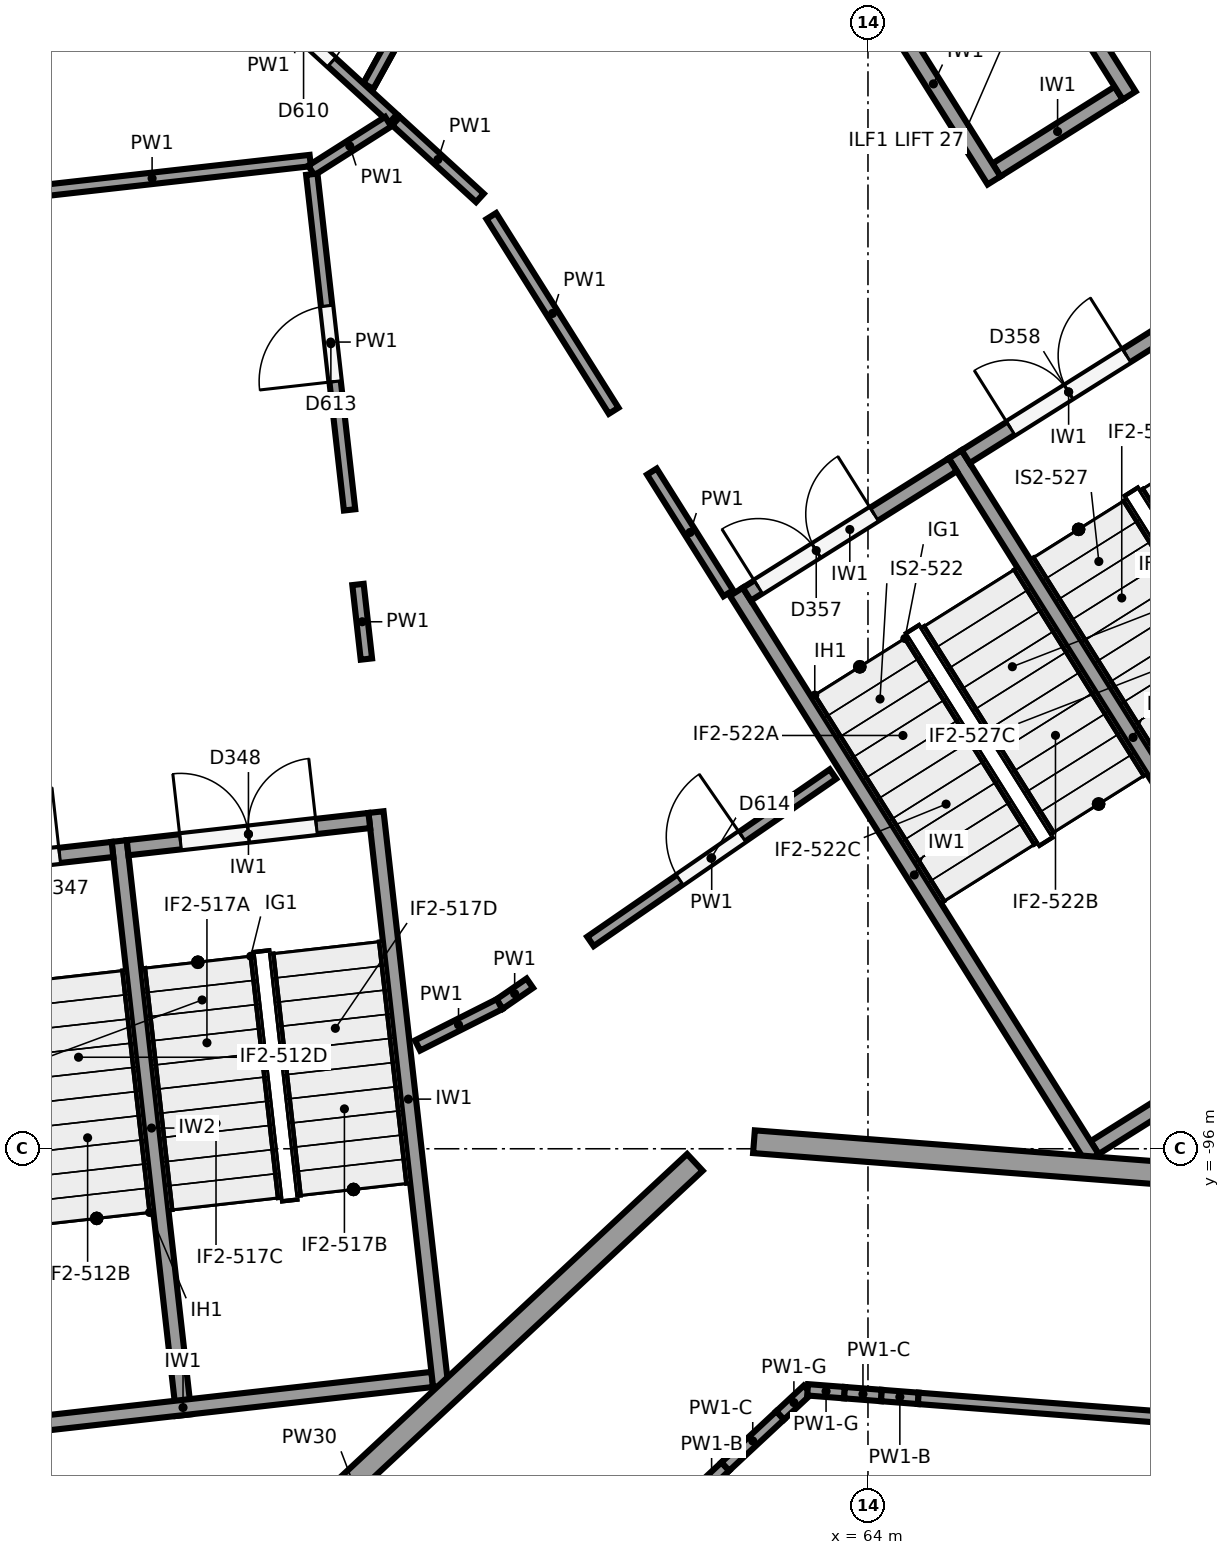
"""IFC4 building model, lengths in metres.
Left out: names, types, materials, properties, quantities, classifications, styles, units other than length and angle.
Written with IfcOpenShell. Run it as: python <this file> out.ifc"""

import sys

from ifc_helpers import new_model, si_unit, direction, frame, frame_2d, origin, origin_2d, place, context, subcontext, project, spatial, rectangle, circle, extrude, element, fill, save


model = new_model("IFC4")
c1 = context("Model", 3, precision=1e-05, world=origin(), true_north=direction((0.0, 1.0)))
c2 = subcontext(c1, "Body", "Model", "MODEL_VIEW")
j1 = project(units=[si_unit("LENGTHUNIT", "METRE"), si_unit("PLANEANGLEUNIT", "RADIAN")], contexts=[c1])
p1 = place(None, origin())
s1 = spatial("IfcSite", under=j1, at=p1, CompositionType="ELEMENT")
p2 = place(p1, origin())
s2 = spatial("IfcBuilding", under=s1, at=p2, CompositionType="ELEMENT")
p3 = place(p2, origin())
s3 = spatial("IfcBuildingStorey", under=s2, at=p3, CompositionType="ELEMENT", Elevation=0.0)
for number, where, z_axis, x_axis in (
    (1, (55.8, -88.542, 0.0), (0.0, 0.0, 1.0), (1.0, 0.0, 0.0)),
    (2, (62.052, -95.873, 0.0), (0.0, 0.0, 1.0), (1.0, 0.0, 0.0)),
):
    element("IfcColumn", number, at=place(p3, frame(where, z_axis=z_axis, x_axis=x_axis)), inside=s3, PredefinedType="COLUMN", context=c2, shape_type="SweptSolid", body=[
        extrude(circle(Radius=0.45, at=origin_2d()), origin(), (0.0, 0.0, 1.0), 6.5),
    ])
p4 = place(p3, frame((63.731, -85.771, 0.0), z_axis=(0.0, 0.0, 1.0), x_axis=(1.0, 0.0, 0.0)))
e3 = element("IfcColumn", 3, at=p4, inside=s3, PredefinedType="COLUMN", context=c2, shape_type="SweptSolid", body=[
    extrude(circle(Radius=0.6, at=origin_2d()), origin(), (0.0, 0.0, 1.0), 6.5),
])
p5 = place(p3, frame((63.373, -99.648, -0.3), z_axis=(0.0, 0.0, 1.0), x_axis=(1.0, 0.0, 0.0)))
e4 = element("IfcColumn", 4, at=p5, inside=s3, PredefinedType="COLUMN", context=c2, shape_type="SweptSolid", body=[
    extrude(circle(Radius=0.4, at=origin_2d()), origin(), (0.0, 0.0, 1.0), 6.8),
])
p6 = place(p3, frame((61.723, -96.179, 0.0), z_axis=(0.0, 0.0, 1.0), x_axis=(-0.731540985517, -0.681797467368, 0.0)))
e5 = element("IfcWall", 5, at=p6, inside=s3, PredefinedType="SOLIDWALL", context=c2, shape_type="SweptSolid", body=[
    extrude(rectangle(XDim=12.314, YDim=0.3, at=frame_2d((6.157, 0.0))), origin(), (0.0, 0.0, 1.0), 4.85),
])
p7 = place(p3, frame((74.977, -96.87, 0.0), z_axis=(0.0, 0.0, 1.0), x_axis=(-0.997035289114, 0.076945644854, 0.0)))
e6 = element("IfcWall", 6, at=p7, inside=s3, PredefinedType="SOLIDWALL", context=c2, shape_type="SweptSolid", body=[
    extrude(rectangle(XDim=12.514, YDim=0.3, at=frame_2d((6.257, 0.0))), origin(), (0.0, 0.0, 1.0), 4.85),
])
p8 = place(p3, frame((58.378, -99.123, 0.0), z_axis=(0.0, 0.0, 1.0), x_axis=(-0.111982724367, 0.993710153638, 0.0)))
e7 = element("IfcWall", 7, at=p8, inside=s3, PredefinedType="SHEAR", context=c2, shape_type="SweptSolid", body=[
    extrude(rectangle(XDim=7.6, YDim=0.2, at=frame_2d((3.8, 0.0))), origin(), (0.0, 0.0, 1.0), 6.15),
])
p9 = place(p3, frame((51.709, -99.774, 0.0), z_axis=(0.0, 0.0, 1.0), x_axis=(0.993715690617, 0.111933579504, 0.0)))
e8 = element("IfcWall", 8, at=p9, inside=s3, PredefinedType="SHEAR", context=c2, shape_type="SweptSolid", body=[
    extrude(rectangle(XDim=6.6, YDim=0.2, at=frame_2d((3.3, 0.0))), origin(), (0.0, 0.0, 1.0), 6.15),
])
p10 = place(p3, frame((54.999, -99.504, 0.0), z_axis=(0.0, 0.0, 1.0), x_axis=(-0.111982724367, 0.993710153638, 0.0)))
e9 = element("IfcWall", 9, at=p10, inside=s3, PredefinedType="SHEAR", context=c2, shape_type="SweptSolid", body=[
    extrude(rectangle(XDim=7.6, YDim=0.2, at=frame_2d((3.8, 0.0))), origin(), (0.0, 0.0, 1.0), 6.15),
])
p11 = place(p3, frame((50.88, -92.42, 0.0), z_axis=(0.0, 0.0, 1.0), x_axis=(0.993707560215, 0.112005735442, 0.0)))
e10 = element("IfcWall", 10, at=p11, inside=s3, PredefinedType="SHEAR", context=c2, shape_type="SweptSolid", body=[
    extrude(rectangle(XDim=3.2, YDim=0.2, at=frame_2d((1.6, 0.0))), origin(), (0.0, 0.0, 1.0), 6.15),
])
p12 = place(p11, frame((0.7, 0.0, 0.0)))
e11 = element("IfcOpeningElement", 11, at=p12, cuts=e10, PredefinedType="OPENING", context=c2, shape_type="SweptSolid", body=[
    extrude(rectangle(XDim=1.8, YDim=2.1, at=frame_2d((0.9, 1.05))), frame((0.0, 0.11, 0.0), z_axis=(0.0, -1.0, 0.0), x_axis=(1.0, 0.0, 0.0)), (0.0, 0.0, 1.0), 0.22),
])
p13 = place(p3, frame((54.259, -92.04, 0.0), z_axis=(0.0, 0.0, 1.0), x_axis=(0.993717005286, 0.11192190762, 0.0)))
e12 = element("IfcWall", 12, at=p13, inside=s3, PredefinedType="SHEAR", context=c2, shape_type="SweptSolid", body=[
    extrude(rectangle(XDim=3.2, YDim=0.2, at=frame_2d((1.6, 0.0))), origin(), (0.0, 0.0, 1.0), 6.15),
])
p14 = place(p13, frame((0.7, 0.0, 0.0)))
e13 = element("IfcOpeningElement", 13, at=p14, cuts=e12, PredefinedType="OPENING", context=c2, shape_type="SweptSolid", body=[
    extrude(rectangle(XDim=1.8, YDim=2.1, at=frame_2d((0.9, 1.05))), frame((0.0, 0.11, 0.0), z_axis=(0.0, -1.0, 0.0), x_axis=(1.0, 0.0, 0.0)), (0.0, 0.0, 1.0), 0.22),
])
p15 = place(p3, frame((66.95, -96.123, 0.0), z_axis=(0.0, 0.0, 1.0), x_axis=(-0.532032334759, 0.846724036963, 0.0)))
e14 = element("IfcWall", 14, at=p15, inside=s3, PredefinedType="SHEAR", context=c2, shape_type="SweptSolid", body=[
    extrude(rectangle(XDim=8.8, YDim=0.2, at=frame_2d((4.4, 0.0))), origin(), (0.0, 0.0, 1.0), 6.15),
])
p16 = place(p3, frame((66.982, -95.986, 0.0), z_axis=(0.0, 0.0, 1.0), x_axis=(0.846719870989, 0.532038964807, 0.0)))
e15 = element("IfcWall", 15, at=p16, inside=s3, PredefinedType="SHEAR", context=c2, shape_type="SweptSolid", body=[
    extrude(rectangle(XDim=6.6, YDim=0.2, at=frame_2d((3.3, 0.0))), origin(), (0.0, 0.0, 1.0), 6.15),
])
p17 = place(p3, frame((69.829, -94.314, 0.0), z_axis=(0.0, 0.0, 1.0), x_axis=(-0.532032334759, 0.846724036963, 0.0)))
e16 = element("IfcWall", 16, at=p17, inside=s3, PredefinedType="SHEAR", context=c2, shape_type="SweptSolid", body=[
    extrude(rectangle(XDim=8.8, YDim=0.2, at=frame_2d((4.4, 0.0))), origin(), (0.0, 0.0, 1.0), 6.15),
])
p18 = place(p3, frame((62.406, -88.704, 0.0), z_axis=(0.0, 0.0, 1.0), x_axis=(0.846735733015, 0.532013720158, 0.0)))
e17 = element("IfcWall", 17, at=p18, inside=s3, PredefinedType="SHEAR", context=c2, shape_type="SweptSolid", body=[
    extrude(rectangle(XDim=3.2, YDim=0.2, at=frame_2d((1.6, 0.0))), origin(), (0.0, 0.0, 1.0), 6.15),
])
p19 = place(p18, frame((0.178, 0.0, 0.0)))
e18 = element("IfcOpeningElement", 18, at=p19, cuts=e17, PredefinedType="OPENING", context=c2, shape_type="SweptSolid", body=[
    extrude(rectangle(XDim=1.8, YDim=2.1, at=frame_2d((0.9, 1.05))), frame((0.0, 0.11, 0.0), z_axis=(0.0, -1.0, 0.0), x_axis=(1.0, 0.0, 0.0)), (0.0, 0.0, 1.0), 0.22),
])
p20 = place(p3, frame((65.285, -86.895, 0.0), z_axis=(0.0, 0.0, 1.0), x_axis=(0.846735733015, 0.532013720158, 0.0)))
e19 = element("IfcWall", 19, at=p20, inside=s3, PredefinedType="SHEAR", context=c2, shape_type="SweptSolid", body=[
    extrude(rectangle(XDim=3.2, YDim=0.2, at=frame_2d((1.6, 0.0))), origin(), (0.0, 0.0, 1.0), 6.15),
])
p21 = place(p20, frame((0.7, 0.0, 0.0)))
e20 = element("IfcOpeningElement", 20, at=p21, cuts=e19, PredefinedType="OPENING", context=c2, shape_type="SweptSolid", body=[
    extrude(rectangle(XDim=1.8, YDim=2.1, at=frame_2d((0.9, 1.05))), frame((0.0, 0.11, 0.0), z_axis=(0.0, -1.0, 0.0), x_axis=(1.0, 0.0, 0.0)), (0.0, 0.0, 1.0), 0.22),
])
p22 = place(p3, frame((65.659, -83.26, 0.0), z_axis=(0.0, 0.0, 1.0), x_axis=(-0.532074873955, 0.846697306306, 0.0)))
e21 = element("IfcWall", 21, at=p22, inside=s3, PredefinedType="SHEAR", context=c2, shape_type="SweptSolid", body=[
    extrude(rectangle(XDim=3.0, YDim=0.2, at=frame_2d((1.5, 0.0))), origin(), (0.0, 0.0, 1.0), 6.15),
])
p23 = place(p3, frame((67.437, -82.143, 0.0), z_axis=(0.0, 0.0, 1.0), x_axis=(-0.532038212918, 0.84672034344, 0.0)))
e22 = element("IfcWall", 22, at=p23, inside=s3, PredefinedType="SHEAR", context=c2, shape_type="SweptSolid", body=[
    extrude(rectangle(XDim=3.0, YDim=0.2, at=frame_2d((1.5, 0.0))), origin(), (0.0, 0.0, 1.0), 6.15),
])
p24 = place(p3, frame((65.69, -83.123, 0.0), z_axis=(0.0, 0.0, 1.0), x_axis=(0.846674592738, 0.532111016623, 0.0)))
e23 = element("IfcWall", 23, at=p24, inside=s3, PredefinedType="SHEAR", context=c2, shape_type="SweptSolid", body=[
    extrude(rectangle(XDim=1.9, YDim=0.2, at=frame_2d((0.95, 0.0))), origin(), (0.0, 0.0, 1.0), 6.15),
])
p25 = place(p3, frame((56.662, -82.999, 0.0), z_axis=(0.0, 0.0, 1.0), x_axis=(-0.993714788705, -0.111941586148, 0.0)))
e24 = element("IfcWall", 24, at=p25, inside=s3, PredefinedType="PARTITIONING", context=c2, shape_type="SweptSolid", body=[
    extrude(rectangle(XDim=4.188, YDim=0.15, at=frame_2d((2.094, 0.0))), origin(), (0.0, 0.0, 1.0), 6.15),
])
p26 = place(p3, frame((55.32, -80.218, 0.0), z_axis=(0.0, 0.0, 1.0), x_axis=(0.73761168742, -0.675225146586, 0.0)))
e25 = element("IfcWall", 25, at=p26, inside=s3, PredefinedType="PARTITIONING", context=c2, shape_type="SweptSolid", body=[
    extrude(rectangle(XDim=3.299, YDim=0.15, at=frame_2d((1.649, 0.0))), origin(), (0.0, 0.0, 1.0), 6.15),
])
p27 = place(p26, frame((1.2, 0.0, 0.0)))
e26 = element("IfcOpeningElement", 26, at=p27, cuts=e25, PredefinedType="OPENING", context=c2, shape_type="SweptSolid", body=[
    extrude(rectangle(XDim=1.0, YDim=2.1, at=frame_2d((0.5, 1.05))), frame((0.0, 0.085, 0.0), z_axis=(0.0, -1.0, 0.0), x_axis=(1.0, 0.0, 0.0)), (0.0, 0.0, 1.0), 0.17),
])
p28 = place(p3, frame((57.688, -82.487, 0.0), z_axis=(0.0, 0.0, 1.0), x_axis=(-0.844198175742, -0.536031193192, 0.0)))
e27 = element("IfcWall", 27, at=p28, inside=s3, PredefinedType="PARTITIONING", context=c2, shape_type="SweptSolid", body=[
    extrude(rectangle(XDim=1.198, YDim=0.15, at=frame_2d((0.599, 0.0))), origin(), (0.0, 0.0, 1.0), 6.15),
])
p29 = place(p3, frame((57.401, -89.557, 0.0), z_axis=(0.0, 0.0, 1.0), x_axis=(-0.111977847894, 0.993710703163, 0.0)))
e28 = element("IfcWall", 28, at=p29, inside=s3, PredefinedType="PARTITIONING", context=c2, shape_type="SweptSolid", body=[
    extrude(rectangle(XDim=0.988, YDim=0.15, at=frame_2d((0.494, 0.0))), origin(), (0.0, 0.0, 1.0), 6.15),
])
p30 = place(p3, frame((57.18, -87.595, 0.0), z_axis=(0.0, 0.0, 1.0), x_axis=(-0.112023313707, 0.993705578723, 0.0)))
e29 = element("IfcWall", 29, at=p30, inside=s3, PredefinedType="PARTITIONING", context=c2, shape_type="SweptSolid", body=[
    extrude(rectangle(XDim=4.444, YDim=0.15, at=frame_2d((2.222, 0.0))), origin(), (0.0, 0.0, 1.0), 6.15),
])
p31 = place(p30, frame((1.7, 0.0, 0.0)))
e30 = element("IfcOpeningElement", 30, at=p31, cuts=e29, PredefinedType="OPENING", context=c2, shape_type="SweptSolid", body=[
    extrude(rectangle(XDim=1.0, YDim=2.1, at=frame_2d((0.5, 1.05))), frame((0.0, 0.085, 0.0), z_axis=(0.0, -1.0, 0.0), x_axis=(1.0, 0.0, 0.0)), (0.0, 0.0, 1.0), 0.17),
])
p32 = place(p3, frame((57.79, -82.479, 0.0), z_axis=(0.0, 0.0, 1.0), x_axis=(0.737580634044, -0.675259067531, 0.0)))
e31 = element("IfcWall", 31, at=p32, inside=s3, PredefinedType="PARTITIONING", context=c2, shape_type="SweptSolid", body=[
    extrude(rectangle(XDim=1.496, YDim=0.15, at=frame_2d((0.748, 0.0))), origin(), (0.0, 0.0, 1.0), 6.15),
])
p33 = place(p3, frame((59.044, -83.729, 0.0), z_axis=(0.0, 0.0, 1.0), x_axis=(0.532093859438, -0.846685375301, 0.0)))
e32 = element("IfcWall", 32, at=p33, inside=s3, PredefinedType="PARTITIONING", context=c2, shape_type="SweptSolid", body=[
    extrude(rectangle(XDim=3.025, YDim=0.15, at=frame_2d((1.513, 0.0))), origin(), (0.0, 0.0, 1.0), 6.15),
])
p34 = place(p3, frame((61.157, -87.091, 0.0), z_axis=(0.0, 0.0, 1.0), x_axis=(0.532052497691, -0.84671136741, 0.0)))
e33 = element("IfcWall", 33, at=p34, inside=s3, PredefinedType="PARTITIONING", context=c2, shape_type="SweptSolid", body=[
    extrude(rectangle(XDim=1.89, YDim=0.15, at=frame_2d((0.945, 0.0))), origin(), (0.0, 0.0, 1.0), 6.15),
])
p35 = place(p3, frame((60.348, -93.272, 0.0), z_axis=(0.0, 0.0, 1.0), x_axis=(0.823118384127, 0.567869814053, 0.0)))
e34 = element("IfcWall", 34, at=p35, inside=s3, PredefinedType="PARTITIONING", context=c2, shape_type="SweptSolid", body=[
    extrude(rectangle(XDim=3.877, YDim=0.15, at=frame_2d((1.938, 0.0))), origin(), (0.0, 0.0, 1.0), 6.15),
])
p36 = place(p35, frame((1.427, 0.0, 0.0)))
e35 = element("IfcOpeningElement", 35, at=p36, cuts=e34, PredefinedType="OPENING", context=c2, shape_type="SweptSolid", body=[
    extrude(rectangle(XDim=1.0, YDim=2.1, at=frame_2d((0.5, 1.05))), frame((0.0, 0.085, 0.0), z_axis=(0.0, -1.0, 0.0), x_axis=(1.0, 0.0, 0.0)), (0.0, 0.0, 1.0), 0.17),
])
p37 = place(p3, frame((59.551, -93.823, 0.0), z_axis=(0.0, 0.0, 1.0), x_axis=(-0.823188427996, -0.567768273165, 0.0)))
e36 = element("IfcWall", 36, at=p37, inside=s3, PredefinedType="PARTITIONING", context=c2, shape_type="SweptSolid", body=[
    extrude(rectangle(XDim=0.485, YDim=0.15, at=frame_2d((0.242, 0.0))), origin(), (0.0, 0.0, 1.0), 6.15),
])
p38 = place(p3, frame((59.152, -94.098, 0.0), z_axis=(0.0, 0.0, 1.0), x_axis=(-0.89288454256, -0.450285680049, 0.0)))
e37 = element("IfcWall", 37, at=p38, inside=s3, PredefinedType="PARTITIONING", context=c2, shape_type="SweptSolid", body=[
    extrude(rectangle(XDim=1.207, YDim=0.15, at=frame_2d((0.604, 0.0))), origin(), (0.0, 0.0, 1.0), 6.15),
])
p39 = place(p3, frame((61.762, -100.517, 0.0), z_axis=(0.0, 0.0, 1.0), x_axis=(0.731417207669, 0.681930251805, 0.0)))
e38 = element("IfcWall", 38, at=p39, inside=s3, PredefinedType="PARTITIONING", context=c2, shape_type="SweptSolid", body=[
    extrude(rectangle(XDim=0.493, YDim=0.15, at=frame_2d((0.247, 0.0))), origin(), (0.0, 0.0, 1.0), 4.85),
])
p40 = place(p3, frame((62.123, -100.18, 0.0), z_axis=(0.0, 0.0, 1.0), x_axis=(0.731655638736, 0.681674428379, 0.0)))
e39 = element("IfcWall", 39, at=p40, inside=s3, PredefinedType="PARTITIONING", context=c2, shape_type="SweptSolid", body=[
    extrude(rectangle(XDim=0.987, YDim=0.15, at=frame_2d((0.493, 0.0))), origin(), (0.0, 0.0, 1.0), 6.05),
])
p41 = place(p3, frame((62.845, -99.508, 0.0), z_axis=(0.0, 0.0, 1.0), x_axis=(0.731417207669, 0.681930251805, 0.0)))
e40 = element("IfcWall", 40, at=p41, inside=s3, PredefinedType="PARTITIONING", context=c2, shape_type="SweptSolid", body=[
    extrude(rectangle(XDim=0.493, YDim=0.15, at=frame_2d((0.247, 0.0))), origin(), (0.0, 0.0, 1.0), 5.4),
])
p42 = place(p3, frame((63.206, -99.171, 0.0), z_axis=(0.0, 0.0, 1.0), x_axis=(0.997051534558, -0.076734851503, 0.0)))
e41 = element("IfcWall", 41, at=p42, inside=s3, PredefinedType="PARTITIONING", context=c2, shape_type="SweptSolid", body=[
    extrude(rectangle(XDim=0.487, YDim=0.15, at=frame_2d((0.243, 0.0))), origin(), (0.0, 0.0, 1.0), 5.4),
])
p43 = place(p3, frame((63.691, -99.209, 0.0), z_axis=(0.0, 0.0, 1.0), x_axis=(0.997054485502, -0.076696498885, 0.0)))
e42 = element("IfcWall", 42, at=p43, inside=s3, PredefinedType="PARTITIONING", context=c2, shape_type="SweptSolid", body=[
    extrude(rectangle(XDim=0.487, YDim=0.15, at=frame_2d((0.244, 0.0))), origin(), (0.0, 0.0, 1.0), 6.05),
])
p44 = place(p3, frame((64.177, -99.246, 0.0), z_axis=(0.0, 0.0, 1.0), x_axis=(0.99701303965, -0.07723340448, 0.0)))
e43 = element("IfcWall", 43, at=p44, inside=s3, PredefinedType="PARTITIONING", context=c2, shape_type="SweptSolid", body=[
    extrude(rectangle(XDim=0.487, YDim=0.15, at=frame_2d((0.243, 0.0))), origin(), (0.0, 0.0, 1.0), 4.85),
])
p45 = place(p3, frame((64.662, -99.284, 0.0), z_axis=(0.0, 0.0, 1.0), x_axis=(0.997035430136, -0.076943817519, 0.0)))
e44 = element("IfcWall", 44, at=p45, inside=s3, PredefinedType="PARTITIONING", context=c2, shape_type="SweptSolid", body=[
    extrude(rectangle(XDim=9.738, YDim=0.15, at=frame_2d((4.869, 0.0))), origin(), (0.0, 0.0, 1.0), 4.85),
])
p46 = place(p3, frame((57.427, -82.02, 0.0), z_axis=(0.0, 0.0, 1.0), x_axis=(0.482565075982, 0.87586011865, 0.0)))
e45 = element("IfcWall", 45, at=p46, inside=s3, PredefinedType="PARTITIONING", context=c2, shape_type="SweptSolid", body=[
    extrude(rectangle(XDim=4.335, YDim=0.15, at=frame_2d((2.167, 0.0))), origin(), (0.0, 0.0, 1.0), 5.05),
])
p47 = place(p46, frame((1.85, 0.0, 0.0)))
e46 = element("IfcOpeningElement", 46, at=p47, cuts=e45, PredefinedType="OPENING", context=c2, shape_type="SweptSolid", body=[
    extrude(rectangle(XDim=1.8, YDim=2.1, at=frame_2d((0.9, 1.05))), frame((0.0, 0.085, 0.0), z_axis=(0.0, -1.0, 0.0), x_axis=(1.0, 0.0, 0.0)), (0.0, 0.0, 1.0), 0.17),
])
p48 = place(p3, frame((57.427, -82.02, 5.05), z_axis=(0.0, 0.0, 1.0), x_axis=(0.482524456718, 0.875882497067, 0.0)))
e47 = element("IfcWall", 47, at=p48, inside=s3, PredefinedType="PARTITIONING", context=c2, shape_type="SweptSolid", body=[
    extrude(rectangle(XDim=1.238, YDim=0.15, at=frame_2d((0.619, 0.0))), origin(), (0.0, 0.0, 1.0), 1.1),
])
p49 = place(p12, origin())
e48 = element("IfcDoor", 48, at=p49, inside=s3, OperationType="DOUBLE_DOOR_SINGLE_SWING", PredefinedType="DOOR", context=c2, shape_type="SweptSolid", body=[
    extrude(rectangle(XDim=1.8, YDim=2.1, at=frame_2d((0.9, 1.05))), frame((0.0, 0.025, 0.0), z_axis=(0.0, -1.0, 0.0), x_axis=(1.0, 0.0, 0.0)), (0.0, 0.0, 1.0), 0.05),
])
fill(e11, e48)
p50 = place(p14, origin())
e49 = element("IfcDoor", 49, at=p50, inside=s3, OperationType="DOUBLE_DOOR_SINGLE_SWING", PredefinedType="DOOR", context=c2, shape_type="SweptSolid", body=[
    extrude(rectangle(XDim=1.8, YDim=2.1, at=frame_2d((0.9, 1.05))), frame((0.0, 0.025, 0.0), z_axis=(0.0, -1.0, 0.0), x_axis=(1.0, 0.0, 0.0)), (0.0, 0.0, 1.0), 0.05),
])
fill(e13, e49)
p51 = place(p19, origin())
e50 = element("IfcDoor", 50, at=p51, inside=s3, OperationType="DOUBLE_DOOR_SINGLE_SWING", PredefinedType="DOOR", context=c2, shape_type="SweptSolid", body=[
    extrude(rectangle(XDim=1.8, YDim=2.1, at=frame_2d((0.9, 1.05))), frame((0.0, 0.025, 0.0), z_axis=(0.0, -1.0, 0.0), x_axis=(1.0, 0.0, 0.0)), (0.0, 0.0, 1.0), 0.05),
])
fill(e18, e50)
p52 = place(p21, origin())
e51 = element("IfcDoor", 51, at=p52, inside=s3, OperationType="DOUBLE_DOOR_SINGLE_SWING", PredefinedType="DOOR", context=c2, shape_type="SweptSolid", body=[
    extrude(rectangle(XDim=1.8, YDim=2.1, at=frame_2d((0.9, 1.05))), frame((0.0, 0.025, 0.0), z_axis=(0.0, -1.0, 0.0), x_axis=(1.0, 0.0, 0.0)), (0.0, 0.0, 1.0), 0.05),
])
fill(e20, e51)
p53 = place(p27, origin())
e52 = element("IfcDoor", 52, at=p53, inside=s3, OperationType="SINGLE_SWING_LEFT", PredefinedType="DOOR", context=c2, shape_type="SweptSolid", body=[
    extrude(rectangle(XDim=1.0, YDim=2.1, at=frame_2d((0.5, 1.05))), frame((0.0, 0.025, 0.0), z_axis=(0.0, -1.0, 0.0), x_axis=(1.0, 0.0, 0.0)), (0.0, 0.0, 1.0), 0.05),
])
fill(e26, e52)
p54 = place(p31, origin())
e53 = element("IfcDoor", 53, at=p54, inside=s3, OperationType="SINGLE_SWING_LEFT", PredefinedType="DOOR", context=c2, shape_type="SweptSolid", body=[
    extrude(rectangle(XDim=1.0, YDim=2.1, at=frame_2d((0.5, 1.05))), frame((0.0, 0.025, 0.0), z_axis=(0.0, -1.0, 0.0), x_axis=(1.0, 0.0, 0.0)), (0.0, 0.0, 1.0), 0.05),
])
fill(e30, e53)
p55 = place(p36, origin())
e54 = element("IfcDoor", 54, at=p55, inside=s3, OperationType="SINGLE_SWING_RIGHT", PredefinedType="DOOR", context=c2, shape_type="SweptSolid", body=[
    extrude(rectangle(XDim=1.0, YDim=2.1, at=frame_2d((0.5, 1.05))), frame((0.0, 0.025, 0.0), z_axis=(0.0, -1.0, 0.0), x_axis=(1.0, 0.0, 0.0)), (0.0, 0.0, 1.0), 0.05),
])
fill(e35, e54)
save(model, sys.argv[1])
